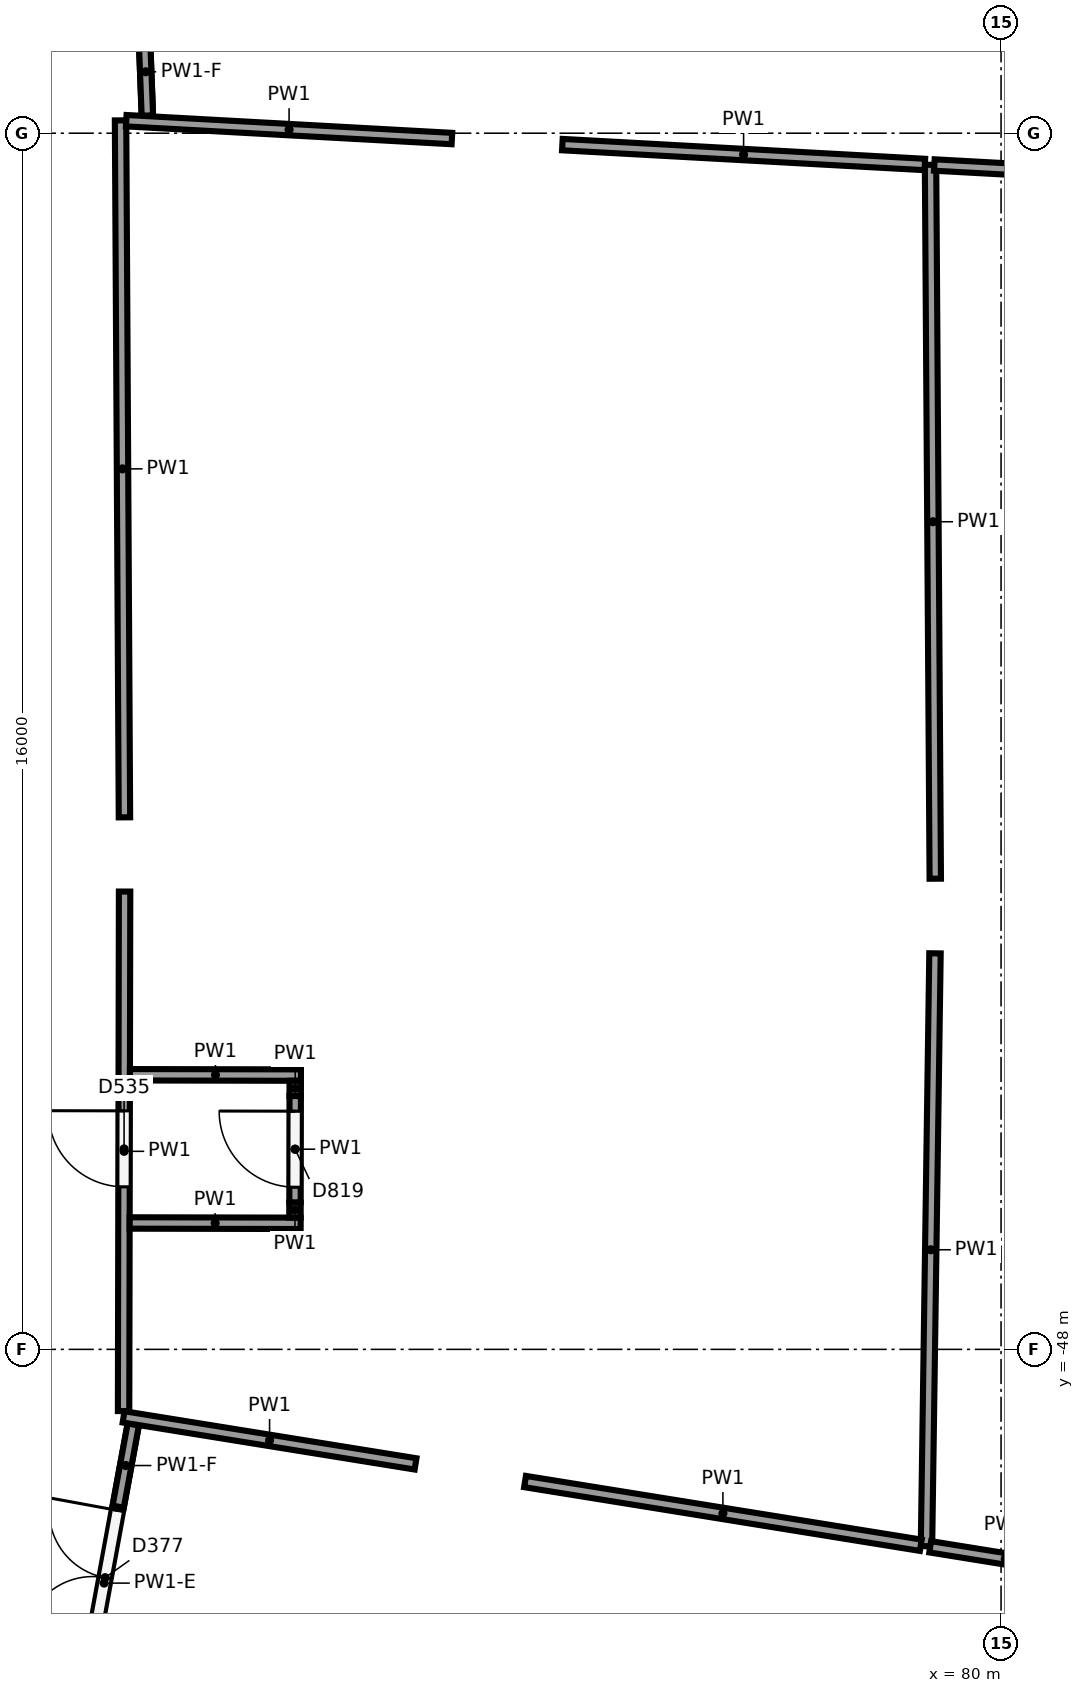
"""IFC4 building model, lengths in metres.
Left out: names, types, materials, properties, quantities, classifications, styles, units other than length and angle.
Written with IfcOpenShell. Run it as: python <this file> out.ifc"""

import sys

from ifc_helpers import new_model, si_unit, direction, frame, frame_2d, origin, origin_2d, place, context, subcontext, project, spatial, rectangle, circle, extrude, element, fill, save


model = new_model("IFC4")
c1 = context("Model", 3, precision=1e-05, world=origin(), true_north=direction((0.0, 1.0)))
c2 = subcontext(c1, "Body", "Model", "MODEL_VIEW")
j1 = project(units=[si_unit("LENGTHUNIT", "METRE"), si_unit("PLANEANGLEUNIT", "RADIAN")], contexts=[c1])
p1 = place(None, origin())
s1 = spatial("IfcSite", under=j1, at=p1, CompositionType="ELEMENT")
p2 = place(p1, origin())
s2 = spatial("IfcBuilding", under=s1, at=p2, CompositionType="ELEMENT")
p3 = place(p2, origin())
s3 = spatial("IfcBuildingStorey", under=s2, at=p3, CompositionType="ELEMENT", Elevation=0.0)
for number, where, z_axis, x_axis in (
    (1, (72.992, -51.847, 0.0), (0.0, 0.0, 1.0), (1.0, 0.0, 0.0)),
    (2, (73.405, -41.862, 0.0), (0.0, 0.0, 1.0), (1.0, 0.0, 0.0)),
):
    element("IfcColumn", number, at=place(p3, frame(where, z_axis=z_axis, x_axis=x_axis)), inside=s3, PredefinedType="COLUMN", context=c2, shape_type="SweptSolid", body=[
        extrude(circle(Radius=0.45, at=origin_2d()), origin(), (0.0, 0.0, 1.0), 6.5),
    ])
p4 = place(p3, frame((79.072, -32.416, 0.0), z_axis=(0.0, 0.0, 1.0), x_axis=(0.006628223816, -0.999978033083, 0.0)))
e3 = element("IfcWall", 3, at=p4, inside=s3, PredefinedType="PARTITIONING", context=c2, shape_type="SweptSolid", body=[
    extrude(rectangle(XDim=9.393, YDim=0.15, at=frame_2d((4.696, 0.0))), origin(), (0.0, 0.0, 1.0), 6.15),
])
p5 = place(p3, frame((79.131, -42.79, 0.0), z_axis=(0.0, 0.0, 1.0), x_axis=(-0.014366063558, -0.999896802784, 0.0)))
e4 = element("IfcWall", 4, at=p5, inside=s3, PredefinedType="PARTITIONING", context=c2, shape_type="SweptSolid", body=[
    extrude(rectangle(XDim=7.8, YDim=0.15, at=frame_2d((3.9, 0.0))), origin(), (0.0, 0.0, 1.0), 6.15),
])
p6 = place(p3, frame((78.944, -50.577, 0.0), z_axis=(0.0, 0.0, 1.0), x_axis=(-0.987278649512, 0.158999585591, 0.0)))
e5 = element("IfcWall", 5, at=p6, inside=s3, PredefinedType="PARTITIONING", context=c2, shape_type="SweptSolid", body=[
    extrude(rectangle(XDim=5.274, YDim=0.15, at=frame_2d((2.637, 0.0))), origin(), (0.0, 0.0, 1.0), 6.15),
])
p7 = place(p3, frame((72.296, -49.507, 0.0), z_axis=(0.0, 0.0, 1.0), x_axis=(-0.987278004814, 0.159003588674, 0.0)))
e6 = element("IfcWall", 6, at=p7, inside=s3, PredefinedType="PARTITIONING", context=c2, shape_type="SweptSolid", body=[
    extrude(rectangle(XDim=3.891, YDim=0.15, at=frame_2d((1.945, 0.0))), origin(), (0.0, 0.0, 1.0), 6.15),
])
p8 = place(p3, frame((68.455, -48.812, 0.0), z_axis=(0.0, 0.0, 1.0), x_axis=(0.001928774496, 0.999998139913, 0.0)))
e7 = element("IfcWall", 7, at=p8, inside=s3, PredefinedType="PARTITIONING", context=c2, shape_type="SweptSolid", body=[
    extrude(rectangle(XDim=6.835, YDim=0.15, at=frame_2d((3.417, 0.0))), origin(), (0.0, 0.0, 1.0), 6.15),
])
p9 = place(p8, frame((2.95, 0.0, 0.0)))
e8 = element("IfcOpeningElement", 8, at=p9, cuts=e7, PredefinedType="OPENING", context=c2, shape_type="SweptSolid", body=[
    extrude(rectangle(XDim=1.0, YDim=2.1, at=frame_2d((0.5, 1.05))), frame((0.0, 0.085, 0.0), z_axis=(0.0, -1.0, 0.0), x_axis=(1.0, 0.0, 0.0)), (0.0, 0.0, 1.0), 0.17),
])
p10 = place(p3, frame((68.467, -41.0, 0.0), z_axis=(0.0, 0.0, 1.0), x_axis=(-0.005591413512, 0.999984367925, 0.0)))
e9 = element("IfcWall", 9, at=p10, inside=s3, PredefinedType="PARTITIONING", context=c2, shape_type="SweptSolid", body=[
    extrude(rectangle(XDim=9.169, YDim=0.15, at=frame_2d((4.585, 0.0))), origin(), (0.0, 0.0, 1.0), 6.15),
])
p11 = place(p3, frame((68.49, -31.835, 0.0), z_axis=(0.0, 0.0, 1.0), x_axis=(0.998501045086, -0.054732649879, 0.0)))
e10 = element("IfcWall", 10, at=p11, inside=s3, PredefinedType="PARTITIONING", context=c2, shape_type="SweptSolid", body=[
    extrude(rectangle(XDim=4.291, YDim=0.15, at=frame_2d((2.146, 0.0))), origin(), (0.0, 0.0, 1.0), 6.15),
])
p12 = place(p3, frame((74.228, -32.15, 0.0), z_axis=(0.0, 0.0, 1.0), x_axis=(0.998497711882, -0.054793424476, 0.0)))
e11 = element("IfcWall", 11, at=p12, inside=s3, PredefinedType="PARTITIONING", context=c2, shape_type="SweptSolid", body=[
    extrude(rectangle(XDim=4.776, YDim=0.15, at=frame_2d((2.388, 0.0))), origin(), (0.0, 0.0, 1.0), 6.15),
])
p13 = place(p3, frame((81.043, -50.915, 0.0), z_axis=(0.0, 0.0, 1.0), x_axis=(-0.987289357967, 0.158933079139, 0.0)))
e12 = element("IfcWall", 12, at=p13, inside=s3, PredefinedType="PARTITIONING", context=c2, shape_type="SweptSolid", body=[
    extrude(rectangle(XDim=2.0, YDim=0.15, at=frame_2d((1.0, 0.0))), origin(), (0.0, 0.0, 1.0), 6.15),
])
p14 = place(p3, frame((79.122, -32.418, 0.0), z_axis=(0.0, 0.0, 1.0), x_axis=(0.998497362752, -0.05479978629, 0.0)))
e13 = element("IfcWall", 13, at=p14, inside=s3, PredefinedType="PARTITIONING", context=c2, shape_type="SweptSolid", body=[
    extrude(rectangle(XDim=2.481, YDim=0.15, at=frame_2d((1.241, 0.0))), origin(), (0.0, 0.0, 1.0), 6.15),
])
for number, where, z_axis, x_axis in (
    (14, (68.535, -46.337, 0.0), (0.0, 0.0, 1.0), (1.0, -0.002, 0.0)),
    (15, (68.539, -44.387, 0.0), (0.0, 0.0, 1.0), (1.0, -0.002, 0.0)),
):
    element("IfcWall", number, at=place(p3, frame(where, z_axis=z_axis, x_axis=x_axis)), inside=s3, PredefinedType="PARTITIONING", context=c2, shape_type="SweptSolid", body=[
        extrude(rectangle(XDim=2.25, YDim=0.15, at=frame_2d((1.125, 0.0))), origin(), (0.0, 0.0, 1.0), 6.15),
    ])
p15 = place(p3, frame((70.71, -46.266, 0.0), z_axis=(0.0, 0.0, 1.0), x_axis=(0.002441995161, 0.999997018325, 0.0)))
e16 = element("IfcWall", 16, at=p15, inside=s3, PredefinedType="PARTITIONING", context=c2, shape_type="SweptSolid", body=[
    extrude(rectangle(XDim=0.2, YDim=0.15, at=frame_2d((0.1, 0.0))), origin(), (0.0, 0.0, 1.0), 6.15),
])
p16 = place(p3, frame((70.71, -46.066, 0.0), z_axis=(0.0, 0.0, 1.0), x_axis=(0.001918378054, 0.999998159911, 0.0)))
e17 = element("IfcWall", 17, at=p16, inside=s3, PredefinedType="PARTITIONING", context=c2, shape_type="SweptSolid", body=[
    extrude(rectangle(XDim=1.4, YDim=0.15, at=frame_2d((0.7, 0.0))), origin(), (0.0, 0.0, 1.0), 6.15),
])
p17 = place(p16, frame((0.2, 0.0, 0.0)))
e18 = element("IfcOpeningElement", 18, at=p17, cuts=e17, PredefinedType="OPENING", context=c2, shape_type="SweptSolid", body=[
    extrude(rectangle(XDim=1.0, YDim=2.1, at=frame_2d((0.5, 1.05))), frame((0.0, 0.085, 0.0), z_axis=(0.0, -1.0, 0.0), x_axis=(1.0, 0.0, 0.0)), (0.0, 0.0, 1.0), 0.17),
])
p18 = place(p3, frame((70.713, -44.667, 0.0), z_axis=(0.0, 0.0, 1.0), x_axis=(0.001221000311, 0.999999254579, 0.0)))
e19 = element("IfcWall", 19, at=p18, inside=s3, PredefinedType="PARTITIONING", context=c2, shape_type="SweptSolid", body=[
    extrude(rectangle(XDim=0.2, YDim=0.15, at=frame_2d((0.1, 0.0))), origin(), (0.0, 0.0, 1.0), 6.15),
])
p19 = place(p3, frame((67.815, -53.163, 0.0), z_axis=(0.0, 0.0, 1.0), x_axis=(0.180787745221, 0.983522135581, 0.0)))
e20 = element("IfcWall", 20, at=p19, inside=s3, PredefinedType="PARTITIONING", context=c2, shape_type="SweptSolid", body=[
    extrude(rectangle(XDim=4.246, YDim=0.15, at=frame_2d((2.123, 0.0))), origin(), (0.0, 0.0, 1.0), 5.25),
])
p20 = place(p19, frame((1.296, 0.0, 0.0)))
e21 = element("IfcOpeningElement", 21, at=p20, cuts=e20, PredefinedType="OPENING", context=c2, shape_type="SweptSolid", body=[
    extrude(rectangle(XDim=1.8, YDim=2.1, at=frame_2d((0.9, 1.05))), frame((0.0, 0.085, 0.0), z_axis=(0.0, -1.0, 0.0), x_axis=(1.0, 0.0, 0.0)), (0.0, 0.0, 1.0), 0.17),
])
p21 = place(p3, frame((68.384, -50.069, 5.25), z_axis=(0.0, 0.0, 1.0), x_axis=(0.180857423265, 0.983509325045, 0.0)))
e22 = element("IfcWall", 22, at=p21, inside=s3, PredefinedType="PARTITIONING", context=c2, shape_type="SweptSolid", body=[
    extrude(rectangle(XDim=1.1, YDim=0.15, at=frame_2d((0.55, 0.0))), origin(), (0.0, 0.0, 1.0), 0.9),
])
p22 = place(p3, frame((68.768, -31.768, 0.0), z_axis=(0.0, 0.0, 1.0), x_axis=(-0.037950234742, 0.999279630375, 0.0)))
e23 = element("IfcWall", 23, at=p22, inside=s3, PredefinedType="PARTITIONING", context=c2, shape_type="SweptSolid", body=[
    extrude(rectangle(XDim=4.252, YDim=0.15, at=frame_2d((2.126, 0.0))), origin(), (0.0, 0.0, 1.0), 5.25),
])
p23 = place(p22, frame((1.202, 0.0, 0.0)))
e24 = element("IfcOpeningElement", 24, at=p23, cuts=e23, PredefinedType="OPENING", context=c2, shape_type="SweptSolid", body=[
    extrude(rectangle(XDim=1.8, YDim=2.1, at=frame_2d((0.9, 1.05))), frame((0.0, 0.085, 0.0), z_axis=(0.0, -1.0, 0.0), x_axis=(1.0, 0.0, 0.0)), (0.0, 0.0, 1.0), 0.17),
])
p24 = place(p3, frame((68.768, -31.768, 5.25), z_axis=(0.0, 0.0, 1.0), x_axis=(-0.037928583753, 0.999280452393, 0.0)))
e25 = element("IfcWall", 25, at=p24, inside=s3, PredefinedType="PARTITIONING", context=c2, shape_type="SweptSolid", body=[
    extrude(rectangle(XDim=1.152, YDim=0.15, at=frame_2d((0.576, 0.0))), origin(), (0.0, 0.0, 1.0), 0.9),
])
p25 = place(p9, origin())
e26 = element("IfcDoor", 26, at=p25, inside=s3, OperationType="SINGLE_SWING_RIGHT", PredefinedType="DOOR", context=c2, shape_type="SweptSolid", body=[
    extrude(rectangle(XDim=1.0, YDim=2.1, at=frame_2d((0.5, 1.05))), frame((0.0, 0.025, 0.0), z_axis=(0.0, -1.0, 0.0), x_axis=(1.0, 0.0, 0.0)), (0.0, 0.0, 1.0), 0.05),
])
fill(e8, e26)
p26 = place(p17, origin())
e27 = element("IfcDoor", 27, at=p26, inside=s3, OperationType="SINGLE_SWING_RIGHT", PredefinedType="DOOR", context=c2, shape_type="SweptSolid", body=[
    extrude(rectangle(XDim=1.0, YDim=2.1, at=frame_2d((0.5, 1.05))), frame((0.0, 0.025, 0.0), z_axis=(0.0, -1.0, 0.0), x_axis=(1.0, 0.0, 0.0)), (0.0, 0.0, 1.0), 0.05),
])
fill(e18, e27)
p27 = place(p20, origin())
e28 = element("IfcDoor", 28, at=p27, inside=s3, OperationType="DOUBLE_DOOR_SINGLE_SWING", PredefinedType="DOOR", context=c2, shape_type="SweptSolid", body=[
    extrude(rectangle(XDim=1.8, YDim=2.1, at=frame_2d((0.9, 1.05))), frame((0.0, 0.025, 0.0), z_axis=(0.0, -1.0, 0.0), x_axis=(1.0, 0.0, 0.0)), (0.0, 0.0, 1.0), 0.05),
])
fill(e21, e28)
save(model, sys.argv[1])
